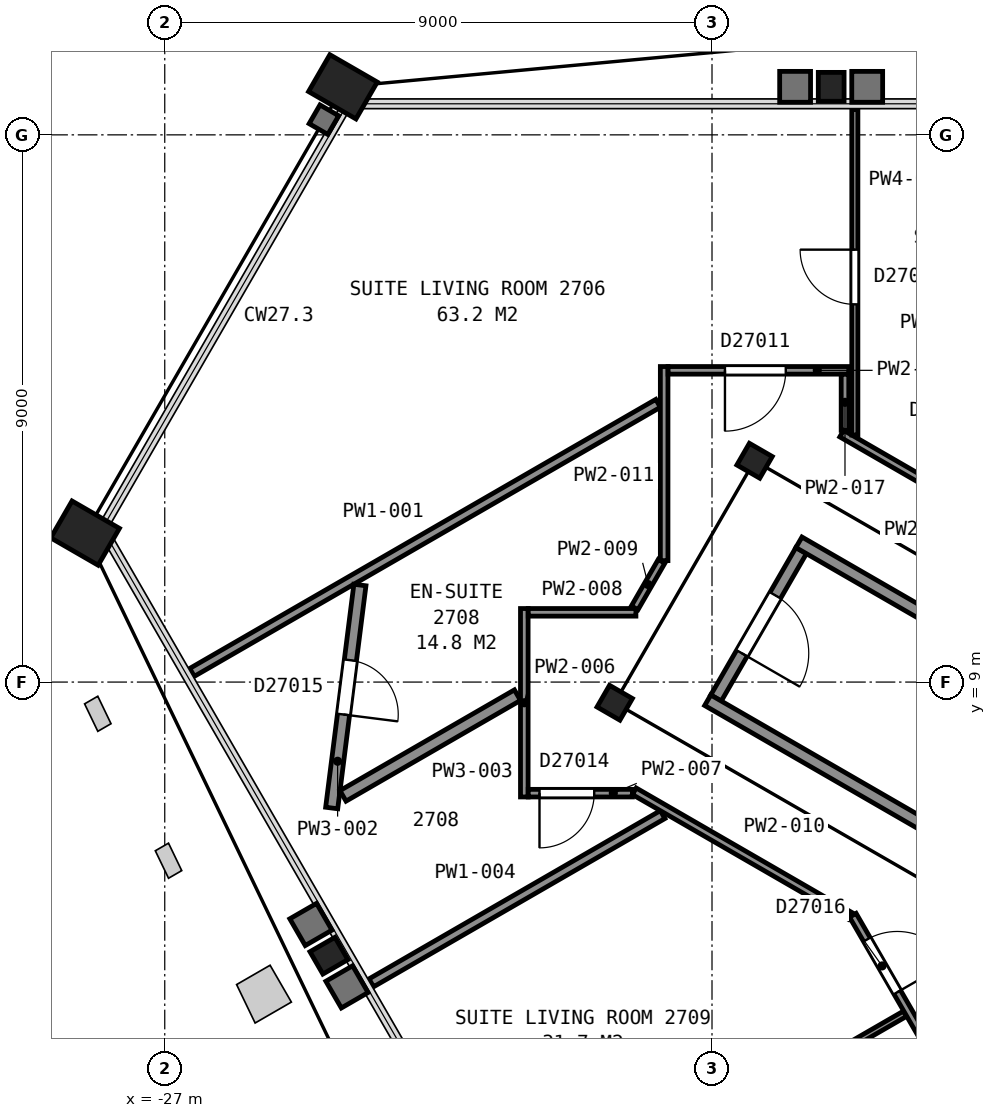
"""IFC4 building model, lengths in metres.
Left out: names, types, materials, properties, quantities, classifications, styles, units other than length and angle.
Written with IfcOpenShell. Run it as: python <this file> out.ifc"""

import sys

from ifc_helpers import new_model, si_unit, direction, frame, frame_2d, origin, origin_2d, place, context, subcontext, project, spatial, rectangle, hollow_rectangle, i_section, extrude, element, fill, save


model = new_model("IFC4")
c1 = context("Model", 3, precision=1e-05, world=origin(), true_north=direction((0.0, 1.0)))
c2 = subcontext(c1, "Body", "Model", "MODEL_VIEW")
j1 = project(units=[si_unit("LENGTHUNIT", "METRE"), si_unit("PLANEANGLEUNIT", "RADIAN")], contexts=[c1])
p1 = place(None, origin())
s1 = spatial("IfcSite", under=j1, at=p1, CompositionType="ELEMENT")
p2 = place(p1, origin())
s2 = spatial("IfcBuilding", under=s1, at=p2, CompositionType="ELEMENT")
p3 = place(p2, frame((0.0, 0.0, 114.4)))
s3 = spatial("IfcBuildingStorey", under=s2, at=p3, CompositionType="ELEMENT", Elevation=114.4)
p4 = place(p3, frame((-16.04, 18.79, 0.0), z_axis=(0.0, 0.0, 1.0), x_axis=(1.0, 0.0, 0.0)))
e1 = element("IfcColumn", 1, at=p4, inside=s3, PredefinedType="COLUMN", context=c2, shape_type="SweptSolid", body=[
    extrude(i_section(OverallWidth=0.424, OverallDepth=0.475, WebThickness=0.048, FlangeThickness=0.077, FilletRadius=0.015, at=origin_2d()), origin(), (0.0, 0.0, 1.0), 3.555),
])
for number, where, z_axis, x_axis in (
    (2, (-24.07, 18.79, 0.0), (0.0, 0.0, 1.0), (0.5, 0.866, 0.0)),
    (3, (-28.31, 11.45, 0.0), (0.0, 0.0, 1.0), (0.5, 0.866, 0.0)),
):
    element("IfcColumn", number, at=place(p3, frame(where, z_axis=z_axis, x_axis=x_axis)), inside=s3, PredefinedType="COLUMN", context=c2, shape_type="SweptSolid", body=[
        extrude(hollow_rectangle(XDim=0.7, YDim=0.9, WallThickness=0.065, at=origin_2d()), origin(), (0.0, 0.0, 1.0), 3.525),
    ])
p5 = place(p3, frame((-24.3, 4.5, 0.0), z_axis=(0.0, 0.0, 1.0), x_axis=(-0.5, 0.866025403784, 0.0)))
e4 = element("IfcColumn", 4, at=p5, inside=s3, PredefinedType="COLUMN", context=c2, shape_type="SweptSolid", body=[
    extrude(i_section(OverallWidth=0.424, OverallDepth=0.475, WebThickness=0.048, FlangeThickness=0.077, FilletRadius=0.015, at=origin_2d()), origin(), (0.0, 0.0, 1.0), 3.555),
])
for number, where, z_axis, x_axis in (
    (5, (-17.3, 12.64, 0.0), (0.0, 0.0, 1.0), (0.5, 0.866, 0.0)),
    (6, (-19.6, 8.66, 0.0), (0.0, 0.0, 1.0), (0.5, 0.866, 0.0)),
):
    element("IfcColumn", number, at=place(p3, frame(where, z_axis=z_axis, x_axis=x_axis)), inside=s3, PredefinedType="COLUMN", context=c2, shape_type="SweptSolid", body=[
        extrude(i_section(OverallWidth=0.411, OverallDepth=0.434, WebThickness=0.036, FlangeThickness=0.057, FilletRadius=0.015, at=origin_2d()), origin(), (0.0, 0.0, 1.0), 3.6),
    ])
p6 = place(p3, frame((-16.534, 11.162, 0.0), z_axis=(0.0, 0.0, 1.0), x_axis=(-0.49998411664, -0.866034573852, 0.0)))
e7 = element("IfcWall", 7, at=p6, inside=s3, PredefinedType="PARTITIONING", context=c2, shape_type="SweptSolid", body=[
    extrude(rectangle(XDim=2.8, YDim=0.2, at=frame_2d((1.4, 0.0))), origin(), (0.0, 0.0, 1.0), 3.35),
])
p7 = place(p6, frame((0.85, 0.0, 0.0)))
e8 = element("IfcOpeningElement", 8, at=p7, cuts=e7, PredefinedType="OPENING", context=c2, shape_type="SweptSolid", body=[
    extrude(rectangle(XDim=1.1, YDim=2.1, at=frame_2d((0.55, 1.05))), frame((0.0, 0.11, 0.0), z_axis=(0.0, -1.0, 0.0), x_axis=(1.0, 0.0, 0.0)), (0.0, 0.0, 1.0), 0.22),
])
for number, where, z_axis, x_axis in (
    (9, (-7.678, 2.701, 0.0), (0.0, 0.0, 1.0), (-0.866, 0.5, 0.0)),
    (10, (-6.178, 5.299, 0.0), (0.0, 0.0, 1.0), (-0.866, 0.5, 0.0)),
):
    element("IfcWall", number, at=place(p3, frame(where, z_axis=z_axis, x_axis=x_axis)), inside=s3, PredefinedType="PARTITIONING", context=c2, shape_type="SweptSolid", body=[
        extrude(rectangle(XDim=12.0, YDim=0.2, at=frame_2d((6.0, 0.0))), origin(), (0.0, 0.0, 1.0), 3.35),
    ])
p8 = place(p3, frame((-26.552, 9.159, 0.0), z_axis=(0.0, 0.0, 1.0), x_axis=(0.866024349092, 0.500001826776, 0.0)))
e11 = element("IfcWall", 11, at=p8, inside=s3, PredefinedType="PARTITIONING", context=c2, shape_type="SweptSolid", body=[
    extrude(rectangle(XDim=8.851, YDim=0.15, at=frame_2d((4.425, 0.0))), origin(), (0.0, 0.0, 1.0), 2.613),
])
p9 = place(p3, frame((-23.79, 10.596, 0.0), z_axis=(0.0, 0.0, 1.0), x_axis=(-0.125611452306, -0.992079514479, 0.0)))
e12 = element("IfcWall", 12, at=p9, inside=s3, PredefinedType="PARTITIONING", context=c2, shape_type="SweptSolid", body=[
    extrude(rectangle(XDim=3.697, YDim=0.2, at=frame_2d((1.848, 0.0))), origin(), (0.0, 0.0, 1.0), 2.613),
])
p10 = place(p9, frame((1.247, 0.0, 0.0)))
e13 = element("IfcOpeningElement", 13, at=p10, cuts=e12, PredefinedType="OPENING", context=c2, shape_type="SweptSolid", body=[
    extrude(rectangle(XDim=0.9, YDim=2.1, at=frame_2d((0.45, 1.05))), frame((0.0, 0.11, 0.0), z_axis=(0.0, -1.0, 0.0), x_axis=(1.0, 0.0, 0.0)), (0.0, 0.0, 1.0), 0.22),
])
p11 = place(p3, frame((-24.069, 7.128, 0.0), z_axis=(0.0, 0.0, 1.0), x_axis=(0.865980660237, 0.50007749009, 0.0)))
e14 = element("IfcWall", 14, at=p11, inside=s3, PredefinedType="PARTITIONING", context=c2, shape_type="SweptSolid", body=[
    extrude(rectangle(XDim=3.313, YDim=0.2, at=frame_2d((1.657, 0.0))), origin(), (0.0, 0.0, 1.0), 2.613),
])
p12 = place(p3, frame((-23.604, 4.053, 0.0), z_axis=(0.0, 0.0, 1.0), x_axis=(0.865961466541, 0.500110726206, 0.0)))
e15 = element("IfcWall", 15, at=p12, inside=s3, PredefinedType="PARTITIONING", context=c2, shape_type="SweptSolid", body=[
    extrude(rectangle(XDim=5.533, YDim=0.15, at=frame_2d((2.767, 0.0))), origin(), (0.0, 0.0, 1.0), 2.613),
])
p13 = place(p3, frame((-14.826, 3.545, 0.0), z_axis=(0.0, 0.0, 1.0), x_axis=(-0.866063309627, -0.499934339407, 0.0)))
e16 = element("IfcWall", 16, at=p13, inside=s3, PredefinedType="PARTITIONING", context=c2, shape_type="SweptSolid", body=[
    extrude(rectangle(XDim=7.348, YDim=0.1, at=frame_2d((3.674, 0.0))), origin(), (0.0, 0.0, 1.0), 2.613),
])
p14 = place(p13, frame((3.143, 0.0, 0.0)))
e17 = element("IfcOpeningElement", 17, at=p14, cuts=e16, PredefinedType="OPENING", context=c2, shape_type="SweptSolid", body=[
    extrude(rectangle(XDim=0.9, YDim=2.1, at=frame_2d((0.45, 1.05))), frame((0.0, 0.06, 0.0), z_axis=(0.0, -1.0, 0.0), x_axis=(1.0, 0.0, 0.0)), (0.0, 0.0, 1.0), 0.12),
])
p15 = place(p3, frame((-21.087, 7.111, 0.0), z_axis=(0.0, 0.0, 1.0), x_axis=(0.0, 1.0, 0.0)))
e18 = element("IfcWall", 18, at=p15, inside=s3, PredefinedType="PARTITIONING", context=c2, shape_type="SweptSolid", body=[
    extrude(rectangle(XDim=3.099, YDim=0.125, at=frame_2d((1.549, 0.0))), origin(), (0.0, 0.0, 1.0), 2.613),
])
p16 = place(p3, frame((-19.309, 7.173, 0.0), z_axis=(0.0, 0.0, 1.0), x_axis=(-1.0, 0.0, 0.0)))
e19 = element("IfcWall", 19, at=p16, inside=s3, PredefinedType="PARTITIONING", context=c2, shape_type="SweptSolid", body=[
    extrude(rectangle(XDim=1.713, YDim=0.125, at=frame_2d((0.856, 0.0))), origin(), (0.0, 0.0, 1.0), 2.613),
])
p17 = place(p16, frame((0.628, 0.0, 0.0)))
e20 = element("IfcOpeningElement", 20, at=p17, cuts=e19, PredefinedType="OPENING", context=c2, shape_type="SweptSolid", body=[
    extrude(rectangle(XDim=0.9, YDim=2.1, at=frame_2d((0.45, 1.05))), frame((0.0, 0.073, 0.0), z_axis=(0.0, -1.0, 0.0), x_axis=(1.0, 0.0, 0.0)), (0.0, 0.0, 1.0), 0.145),
])
p18 = place(p3, frame((-21.022, 10.147, 0.0), z_axis=(0.0, 0.0, 1.0), x_axis=(1.0, 0.0, 0.0)))
e21 = element("IfcWall", 21, at=p18, inside=s3, PredefinedType="PARTITIONING", context=c2, shape_type="SweptSolid", body=[
    extrude(rectangle(XDim=1.771, YDim=0.125, at=frame_2d((0.885, 0.0))), origin(), (0.0, 0.0, 1.0), 2.613),
])
p19 = place(p3, frame((-19.271, 10.221, 0.0), z_axis=(0.0, 0.0, 1.0), x_axis=(0.499881837328, 0.866093614288, 0.0)))
e22 = element("IfcWall", 22, at=p19, inside=s3, PredefinedType="PARTITIONING", context=c2, shape_type="SweptSolid", body=[
    extrude(rectangle(XDim=0.884, YDim=0.125, at=frame_2d((0.442, 0.0))), origin(), (0.0, 0.0, 1.0), 2.613),
])
p20 = place(p3, frame((-19.278, 7.204, 0.0), z_axis=(0.0, 0.0, 1.0), x_axis=(0.865992261418, -0.50005739987, 0.0)))
e23 = element("IfcWall", 23, at=p20, inside=s3, PredefinedType="PARTITIONING", context=c2, shape_type="SweptSolid", body=[
    extrude(rectangle(XDim=4.101, YDim=0.125, at=frame_2d((2.051, 0.0))), origin(), (0.0, 0.0, 1.0), 2.613),
])
p21 = place(p3, frame((-18.787, 10.998, 0.0), z_axis=(0.0, 0.0, 1.0), x_axis=(0.0, 1.0, 0.0)))
e24 = element("IfcWall", 24, at=p21, inside=s3, PredefinedType="PARTITIONING", context=c2, shape_type="SweptSolid", body=[
    extrude(rectangle(XDim=3.192, YDim=0.125, at=frame_2d((1.596, 0.0))), origin(), (0.0, 0.0, 1.0), 2.613),
])
p22 = place(p3, frame((-18.722, 14.127, 0.0), z_axis=(0.0, 0.0, 1.0), x_axis=(1.0, 0.0, 0.0)))
e25 = element("IfcWall", 25, at=p22, inside=s3, PredefinedType="PARTITIONING", context=c2, shape_type="SweptSolid", body=[
    extrude(rectangle(XDim=2.971, YDim=0.125, at=frame_2d((1.486, 0.0))), origin(), (0.0, 0.0, 1.0), 2.613),
])
p23 = place(p22, frame((0.935, 0.0, 0.0)))
e26 = element("IfcOpeningElement", 26, at=p23, cuts=e25, PredefinedType="OPENING", context=c2, shape_type="SweptSolid", body=[
    extrude(rectangle(XDim=1.0, YDim=2.1, at=frame_2d((0.5, 1.05))), frame((0.0, 0.073, 0.0), z_axis=(0.0, -1.0, 0.0), x_axis=(1.0, 0.0, 0.0)), (0.0, 0.0, 1.0), 0.145),
])
p24 = place(p3, frame((-15.813, 13.14, 0.0), z_axis=(0.0, 0.0, 1.0), x_axis=(0.0, 1.0, 0.0)))
e27 = element("IfcWall", 27, at=p24, inside=s3, PredefinedType="PARTITIONING", context=c2, shape_type="SweptSolid", body=[
    extrude(rectangle(XDim=0.922, YDim=0.125, at=frame_2d((0.461, 0.0))), origin(), (0.0, 0.0, 1.0), 2.613),
])
p25 = place(p3, frame((-15.867, 13.086, 0.0), z_axis=(0.0, 0.0, 1.0), x_axis=(0.866070231021, -0.499922348909, 0.0)))
e28 = element("IfcWall", 28, at=p25, inside=s3, PredefinedType="PARTITIONING", context=c2, shape_type="SweptSolid", body=[
    extrude(rectangle(XDim=4.088, YDim=0.125, at=frame_2d((2.044, 0.0))), origin(), (0.0, 0.0, 1.0), 2.613),
])
p26 = place(p3, frame((-3.756, -15.494, 0.0), z_axis=(0.0, 0.0, 1.0), x_axis=(-0.500027787016, 0.866009360349, 0.0)))
e29 = element("IfcWall", 29, at=p26, inside=s3, PredefinedType="PARTITIONING", context=c2, shape_type="SweptSolid", body=[
    extrude(rectangle(XDim=23.856, YDim=0.125, at=frame_2d((11.928, 0.0))), origin(), (0.0, 0.0, 1.0), 2.613),
])
p27 = place(p26, frame((22.393, 0.0, 0.0)))
e30 = element("IfcOpeningElement", 30, at=p27, cuts=e29, PredefinedType="OPENING", context=c2, shape_type="SweptSolid", body=[
    extrude(rectangle(XDim=1.0, YDim=2.1, at=frame_2d((0.5, 1.05))), frame((0.0, 0.073, 0.0), z_axis=(0.0, -1.0, 0.0), x_axis=(1.0, 0.0, 0.0)), (0.0, 0.0, 1.0), 0.145),
])
p28 = place(p26, frame((12.996, 0.0, 0.0)))
e31 = element("IfcOpeningElement", 31, at=p28, cuts=e29, PredefinedType="OPENING", context=c2, shape_type="SweptSolid", body=[
    extrude(rectangle(XDim=0.9, YDim=2.1, at=frame_2d((0.45, 1.05))), frame((0.0, 0.073, 0.0), z_axis=(0.0, -1.0, 0.0), x_axis=(1.0, 0.0, 0.0)), (0.0, 0.0, 1.0), 0.145),
])
p29 = place(p26, frame((9.011, 0.0, 0.0)))
e32 = element("IfcOpeningElement", 32, at=p29, cuts=e29, PredefinedType="OPENING", context=c2, shape_type="SweptSolid", body=[
    extrude(rectangle(XDim=1.0, YDim=2.1, at=frame_2d((0.5, 1.05))), frame((0.0, 0.073, 0.0), z_axis=(0.0, -1.0, 0.0), x_axis=(1.0, 0.0, 0.0)), (0.0, 0.0, 1.0), 0.145),
])
p30 = place(p3, frame((-15.651, 18.415, 0.0), z_axis=(0.0, 0.0, 1.0), x_axis=(0.0, -1.0, 0.0)))
e33 = element("IfcWall", 33, at=p30, inside=s3, PredefinedType="PARTITIONING", context=c2, shape_type="SweptSolid", body=[
    extrude(rectangle(XDim=5.352, YDim=0.1, at=frame_2d((2.676, 0.0))), origin(), (0.0, 0.0, 1.0), 2.613),
])
p31 = place(p30, frame((2.303, 0.0, 0.0)))
e34 = element("IfcOpeningElement", 34, at=p31, cuts=e33, PredefinedType="OPENING", context=c2, shape_type="SweptSolid", body=[
    extrude(rectangle(XDim=0.9, YDim=2.1, at=frame_2d((0.45, 1.05))), frame((0.0, 0.06, 0.0), z_axis=(0.0, -1.0, 0.0), x_axis=(1.0, 0.0, 0.0)), (0.0, 0.0, 1.0), 0.12),
])
p32 = place(p7, origin())
e35 = element("IfcDoor", 35, at=p32, inside=s3, OperationType="SINGLE_SWING_RIGHT", PredefinedType="DOOR", context=c2, shape_type="SweptSolid", body=[
    extrude(rectangle(XDim=1.1, YDim=2.1, at=frame_2d((0.55, 1.05))), frame((0.0, 0.025, 0.0), z_axis=(0.0, -1.0, 0.0), x_axis=(1.0, 0.0, 0.0)), (0.0, 0.0, 1.0), 0.05),
])
fill(e8, e35)
p33 = place(p10, origin())
e36 = element("IfcDoor", 36, at=p33, inside=s3, OperationType="SINGLE_SWING_RIGHT", PredefinedType="DOOR", context=c2, shape_type="SweptSolid", body=[
    extrude(rectangle(XDim=0.9, YDim=2.1, at=frame_2d((0.45, 1.05))), frame((0.0, 0.025, 0.0), z_axis=(0.0, -1.0, 0.0), x_axis=(1.0, 0.0, 0.0)), (0.0, 0.0, 1.0), 0.05),
])
fill(e13, e36)
p34 = place(p17, origin())
e37 = element("IfcDoor", 37, at=p34, inside=s3, OperationType="SINGLE_SWING_RIGHT", PredefinedType="DOOR", context=c2, shape_type="SweptSolid", body=[
    extrude(rectangle(XDim=0.9, YDim=2.1, at=frame_2d((0.45, 1.05))), frame((0.0, 0.025, 0.0), z_axis=(0.0, -1.0, 0.0), x_axis=(1.0, 0.0, 0.0)), (0.0, 0.0, 1.0), 0.05),
])
fill(e20, e37)
p35 = place(p23, origin())
e38 = element("IfcDoor", 38, at=p35, inside=s3, OperationType="SINGLE_SWING_LEFT", PredefinedType="DOOR", context=c2, shape_type="SweptSolid", body=[
    extrude(rectangle(XDim=1.0, YDim=2.1, at=frame_2d((0.5, 1.05))), frame((0.0, 0.025, 0.0), z_axis=(0.0, -1.0, 0.0), x_axis=(1.0, 0.0, 0.0)), (0.0, 0.0, 1.0), 0.05),
])
fill(e26, e38)
p36 = place(p27, origin())
e39 = element("IfcDoor", 39, at=p36, inside=s3, OperationType="SINGLE_SWING_LEFT", PredefinedType="DOOR", context=c2, shape_type="SweptSolid", body=[
    extrude(rectangle(XDim=1.0, YDim=2.1, at=frame_2d((0.5, 1.05))), frame((0.0, 0.025, 0.0), z_axis=(0.0, -1.0, 0.0), x_axis=(1.0, 0.0, 0.0)), (0.0, 0.0, 1.0), 0.05),
])
fill(e30, e39)
p37 = place(p31, origin())
e40 = element("IfcDoor", 40, at=p37, inside=s3, OperationType="SINGLE_SWING_LEFT", PredefinedType="DOOR", context=c2, shape_type="SweptSolid", body=[
    extrude(rectangle(XDim=0.9, YDim=2.1, at=frame_2d((0.45, 1.05))), frame((0.0, 0.025, 0.0), z_axis=(0.0, -1.0, 0.0), x_axis=(1.0, 0.0, 0.0)), (0.0, 0.0, 1.0), 0.05),
])
fill(e34, e40)
save(model, sys.argv[1])
